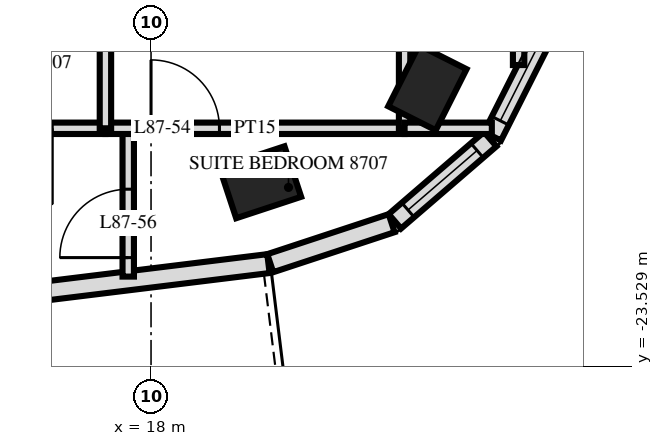
"""IFC4 building model, lengths in metres.
Left out: names, types, materials, properties, quantities, classifications, styles, units other than length and angle.
Written with IfcOpenShell. Run it as: python <this file> out.ifc"""

import sys

from ifc_helpers import new_model, si_unit, direction, frame, frame_2d, origin, origin_2d, place, context, subcontext, project, spatial, rectangle, extrude, element, fill, save


model = new_model("IFC4")
c1 = context("Model", 3, precision=1e-05, world=origin(), true_north=direction((0.0, 1.0)))
c2 = subcontext(c1, "Body", "Model", "MODEL_VIEW")
j1 = project(units=[si_unit("LENGTHUNIT", "METRE"), si_unit("PLANEANGLEUNIT", "RADIAN")], contexts=[c1])
p1 = place(None, origin())
s1 = spatial("IfcSite", under=j1, at=p1, CompositionType="ELEMENT")
p2 = place(p1, origin())
s2 = spatial("IfcBuilding", under=s1, at=p2, CompositionType="ELEMENT")
p3 = place(p2, frame((0.0, 0.0, 330.6)))
s3 = spatial("IfcBuildingStorey", under=s2, at=p3, CompositionType="ELEMENT", Elevation=330.6)
for number, where, z_axis, x_axis in (
    (1, (19.438, -21.11, 0.0), (0.0, 0.0, 1.0), (0.95, 0.313, 0.0)),
    (2, (21.636, -19.866, 0.0), (0.0, 0.0, 1.0), (0.45, 0.893, 0.0)),
):
    element("IfcColumn", number, at=place(p3, frame(where, z_axis=z_axis, x_axis=x_axis)), inside=s3, PredefinedType="COLUMN", context=c2, shape_type="SweptSolid", body=[
        extrude(rectangle(XDim=0.9, YDim=0.7, at=origin_2d()), origin(), (0.0, 0.0, 1.0), 4.0),
    ])
p4 = place(p3, frame((-16.138, -26.561, 0.0), z_axis=(0.0, 0.0, 1.0), x_axis=(0.992546726876, 0.121864658405, 0.0)))
e3 = element("IfcWall", 3, at=p4, inside=s3, PredefinedType="SOLIDWALL", context=c2, shape_type="SweptSolid", body=[
    extrude(rectangle(XDim=35.951, YDim=0.25, at=frame_2d((17.975, 0.0))), origin(), (0.0, 0.0, 1.0), 3.72),
])
p5 = place(p4, frame((0.575, 0.0, 0.0)))
e4 = element("IfcOpeningElement", 4, at=p5, cuts=e3, PredefinedType="OPENING", context=c2, shape_type="SweptSolid", body=[
    extrude(rectangle(XDim=1.8, YDim=2.4, at=frame_2d((0.9, 1.2))), frame((0.0, 0.135, 0.0), z_axis=(0.0, -1.0, 0.0), x_axis=(1.0, 0.0, 0.0)), (0.0, 0.0, 1.0), 0.27),
])
p6 = place(p4, frame((6.576, 0.0, 0.0)))
e5 = element("IfcOpeningElement", 5, at=p6, cuts=e3, PredefinedType="OPENING", context=c2, shape_type="SweptSolid", body=[
    extrude(rectangle(XDim=1.8, YDim=2.4, at=frame_2d((0.9, 1.2))), frame((0.0, 0.135, 0.0), z_axis=(0.0, -1.0, 0.0), x_axis=(1.0, 0.0, 0.0)), (0.0, 0.0, 1.0), 0.27),
])
p7 = place(p4, frame((12.575, 0.0, 0.0)))
e6 = element("IfcOpeningElement", 6, at=p7, cuts=e3, PredefinedType="OPENING", context=c2, shape_type="SweptSolid", body=[
    extrude(rectangle(XDim=1.8, YDim=2.4, at=frame_2d((0.9, 1.2))), frame((0.0, 0.135, 0.0), z_axis=(0.0, -1.0, 0.0), x_axis=(1.0, 0.0, 0.0)), (0.0, 0.0, 1.0), 0.27),
])
p8 = place(p4, frame((18.575, 0.0, 0.0)))
e7 = element("IfcOpeningElement", 7, at=p8, cuts=e3, PredefinedType="OPENING", context=c2, shape_type="SweptSolid", body=[
    extrude(rectangle(XDim=1.8, YDim=2.4, at=frame_2d((0.9, 1.2))), frame((0.0, 0.135, 0.0), z_axis=(0.0, -1.0, 0.0), x_axis=(1.0, 0.0, 0.0)), (0.0, 0.0, 1.0), 0.27),
])
p9 = place(p4, frame((22.528, 0.0, 0.0)))
e8 = element("IfcOpeningElement", 8, at=p9, cuts=e3, PredefinedType="OPENING", context=c2, shape_type="SweptSolid", body=[
    extrude(rectangle(XDim=1.2, YDim=2.4, at=frame_2d((0.6, 1.2))), frame((0.0, 0.135, 0.0), z_axis=(0.0, -1.0, 0.0), x_axis=(1.0, 0.0, 0.0)), (0.0, 0.0, 1.0), 0.27),
])
p10 = place(p4, frame((25.923, 0.0, 0.0)))
e9 = element("IfcOpeningElement", 9, at=p10, cuts=e3, PredefinedType="OPENING", context=c2, shape_type="SweptSolid", body=[
    extrude(rectangle(XDim=1.8, YDim=2.4, at=frame_2d((0.9, 1.2))), frame((0.0, 0.135, 0.0), z_axis=(0.0, -1.0, 0.0), x_axis=(1.0, 0.0, 0.0)), (0.0, 0.0, 1.0), 0.27),
])
p11 = place(p4, frame((30.576, 0.0, 0.0)))
e10 = element("IfcOpeningElement", 10, at=p11, cuts=e3, PredefinedType="OPENING", context=c2, shape_type="SweptSolid", body=[
    extrude(rectangle(XDim=1.8, YDim=2.4, at=frame_2d((0.9, 1.2))), frame((0.0, 0.135, 0.0), z_axis=(0.0, -1.0, 0.0), x_axis=(1.0, 0.0, 0.0)), (0.0, 0.0, 1.0), 0.27),
])
p12 = place(p3, frame((19.568, -22.175, 0.0), z_axis=(0.0, 0.0, 1.0), x_axis=(0.949694735798, 0.313177120489, 0.0)))
e11 = element("IfcWall", 11, at=p12, inside=s3, PredefinedType="SOLIDWALL", context=c2, shape_type="SweptSolid", body=[
    extrude(rectangle(XDim=1.681, YDim=0.25, at=frame_2d((0.841, 0.0))), origin(), (0.0, 0.0, 1.0), 3.72),
])
p13 = place(p3, frame((21.208, -21.624, 0.0), z_axis=(0.0, 0.0, 1.0), x_axis=(0.757568315466, 0.652755886531, 0.0)))
e12 = element("IfcWall", 12, at=p13, inside=s3, PredefinedType="SOLIDWALL", context=c2, shape_type="SweptSolid", body=[
    extrude(rectangle(XDim=1.656, YDim=0.25, at=frame_2d((0.828, 0.0))), origin(), (0.0, 0.0, 1.0), 3.72),
])
p14 = place(p13, frame((0.228, 0.0, 0.9)))
e13 = element("IfcOpeningElement", 13, at=p14, cuts=e12, PredefinedType="OPENING", context=c2, shape_type="SweptSolid", body=[
    extrude(rectangle(XDim=1.2, YDim=1.5, at=frame_2d((0.6, 0.75))), frame((0.0, 0.135, 0.0), z_axis=(0.0, -1.0, 0.0), x_axis=(1.0, 0.0, 0.0)), (0.0, 0.0, 1.0), 0.27),
])
p15 = place(p3, frame((22.493, -20.505, 0.0), z_axis=(0.0, 0.0, 1.0), x_axis=(0.449982385812, 0.893037430604, 0.0)))
e14 = element("IfcWall", 14, at=p15, inside=s3, PredefinedType="SOLIDWALL", context=c2, shape_type="SweptSolid", body=[
    extrude(rectangle(XDim=1.656, YDim=0.25, at=frame_2d((0.828, 0.0))), origin(), (0.0, 0.0, 1.0), 3.72),
])
p16 = place(p15, frame((0.228, 0.0, 0.9)))
e15 = element("IfcOpeningElement", 15, at=p16, cuts=e14, PredefinedType="OPENING", context=c2, shape_type="SweptSolid", body=[
    extrude(rectangle(XDim=1.2, YDim=1.5, at=frame_2d((0.6, 0.75))), frame((0.0, 0.135, 0.0), z_axis=(0.0, -1.0, 0.0), x_axis=(1.0, 0.0, 0.0)), (0.0, 0.0, 1.0), 0.27),
])
p17 = place(p3, frame((22.836, -19.568, 0.0), z_axis=(0.0, 0.0, 1.0), x_axis=(0.0, 1.0, 0.0)))
e16 = element("IfcWall", 16, at=p17, inside=s3, PredefinedType="PLUMBINGWALL", context=c2, shape_type="SweptSolid", body=[
    extrude(rectangle(XDim=2.768, YDim=0.15, at=frame_2d((1.384, 0.0))), origin(), (0.0, 0.0, 1.0), 3.72),
])
p18 = place(p3, frame((21.336, -20.4, 0.0), z_axis=(0.0, 0.0, 1.0), x_axis=(0.0, 1.0, 0.0)))
e17 = element("IfcWall", 17, at=p18, inside=s3, PredefinedType="PLUMBINGWALL", context=c2, shape_type="SweptSolid", body=[
    extrude(rectangle(XDim=3.6, YDim=0.15, at=frame_2d((1.8, 0.0))), origin(), (0.0, 0.0, 1.0), 3.72),
])
p19 = place(p18, frame((1.42, 0.0, 0.0)))
e18 = element("IfcOpeningElement", 18, at=p19, cuts=e17, PredefinedType="OPENING", context=c2, shape_type="SweptSolid", body=[
    extrude(rectangle(XDim=0.8, YDim=2.1, at=frame_2d((0.4, 1.05))), frame((0.0, 0.085, 0.0), z_axis=(0.0, -1.0, 0.0), x_axis=(1.0, 0.0, 0.0)), (0.0, 0.0, 1.0), 0.17),
])
p20 = place(p3, frame((17.7, -22.351, 0.0), z_axis=(0.0, 0.0, 1.0), x_axis=(0.0, 1.0, 0.0)))
e19 = element("IfcWall", 19, at=p20, inside=s3, PredefinedType="PARTITIONING", context=c2, shape_type="SweptSolid", body=[
    extrude(rectangle(XDim=1.951, YDim=0.15, at=frame_2d((0.976, 0.0))), origin(), (0.0, 0.0, 1.0), 3.72),
])
p21 = place(p20, frame((0.25, 0.0, 0.0)))
e20 = element("IfcOpeningElement", 20, at=p21, cuts=e19, PredefinedType="OPENING", context=c2, shape_type="SweptSolid", body=[
    extrude(rectangle(XDim=0.9, YDim=2.1, at=frame_2d((0.45, 1.05))), frame((0.0, 0.085, 0.0), z_axis=(0.0, -1.0, 0.0), x_axis=(1.0, 0.0, 0.0)), (0.0, 0.0, 1.0), 0.17),
])
p22 = place(p3, frame((17.4, -20.4, 0.0), z_axis=(0.0, 0.0, 1.0), x_axis=(0.0, 1.0, 0.0)))
e21 = element("IfcWall", 21, at=p22, inside=s3, PredefinedType="PARTITIONING", context=c2, shape_type="SweptSolid", body=[
    extrude(rectangle(XDim=3.6, YDim=0.15, at=frame_2d((1.8, 0.0))), origin(), (0.0, 0.0, 1.0), 3.72),
])
p23 = place(p3, frame((15.0, -20.4, 0.0), z_axis=(0.0, 0.0, 1.0), x_axis=(1.0, 0.0, 0.0)))
e22 = element("IfcWall", 22, at=p23, inside=s3, PredefinedType="PARTITIONING", context=c2, shape_type="SweptSolid", body=[
    extrude(rectangle(XDim=2.4, YDim=0.15, at=frame_2d((1.2, 0.0))), origin(), (0.0, 0.0, 1.0), 3.72),
])
p24 = place(p23, frame((0.7, 0.0, 0.0)))
e23 = element("IfcOpeningElement", 23, at=p24, cuts=e22, PredefinedType="OPENING", context=c2, shape_type="SweptSolid", body=[
    extrude(rectangle(XDim=1.0, YDim=2.1, at=frame_2d((0.5, 1.05))), frame((0.0, 0.085, 0.0), z_axis=(0.0, -1.0, 0.0), x_axis=(1.0, 0.0, 0.0)), (0.0, 0.0, 1.0), 0.17),
])
p25 = place(p3, frame((17.4, -20.4, 0.0), z_axis=(0.0, 0.0, 1.0), x_axis=(1.0, 0.0, 0.0)))
e24 = element("IfcWall", 24, at=p25, inside=s3, PredefinedType="PARTITIONING", context=c2, shape_type="SweptSolid", body=[
    extrude(rectangle(XDim=3.936, YDim=0.15, at=frame_2d((1.968, 0.0))), origin(), (0.0, 0.0, 1.0), 3.72),
])
p26 = place(p25, frame((0.6, 0.0, 0.0)))
e25 = element("IfcOpeningElement", 25, at=p26, cuts=e24, PredefinedType="OPENING", context=c2, shape_type="SweptSolid", body=[
    extrude(rectangle(XDim=0.9, YDim=2.1, at=frame_2d((0.45, 1.05))), frame((0.0, 0.085, 0.0), z_axis=(0.0, -1.0, 0.0), x_axis=(1.0, 0.0, 0.0)), (0.0, 0.0, 1.0), 0.17),
])
p27 = place(p3, frame((21.336, -20.4, 0.0), z_axis=(0.0, 0.0, 1.0), x_axis=(1.0, 0.0, 0.0)))
e26 = element("IfcWall", 26, at=p27, inside=s3, PredefinedType="PLUMBINGWALL", context=c2, shape_type="SweptSolid", body=[
    extrude(rectangle(XDim=1.148, YDim=0.15, at=frame_2d((0.574, 0.0))), origin(), (0.0, 0.0, 1.0), 3.72),
])
p28 = place(p14, origin())
e27 = element("IfcWindow", 27, at=p28, inside=s3, PartitioningType="SINGLE_PANEL", PredefinedType="WINDOW", context=c2, shape_type="SweptSolid", body=[
    extrude(rectangle(XDim=1.2, YDim=1.5, at=frame_2d((0.6, 0.75))), frame((0.0, 0.03, 0.0), z_axis=(0.0, -1.0, 0.0), x_axis=(1.0, 0.0, 0.0)), (0.0, 0.0, 1.0), 0.06),
])
fill(e13, e27)
p29 = place(p16, origin())
e28 = element("IfcWindow", 28, at=p29, inside=s3, PartitioningType="SINGLE_PANEL", PredefinedType="WINDOW", context=c2, shape_type="SweptSolid", body=[
    extrude(rectangle(XDim=1.2, YDim=1.5, at=frame_2d((0.6, 0.75))), frame((0.0, 0.03, 0.0), z_axis=(0.0, -1.0, 0.0), x_axis=(1.0, 0.0, 0.0)), (0.0, 0.0, 1.0), 0.06),
])
fill(e15, e28)
p30 = place(p26, origin())
e29 = element("IfcDoor", 29, at=p30, inside=s3, OperationType="SINGLE_SWING_RIGHT", PredefinedType="DOOR", context=c2, shape_type="SweptSolid", body=[
    extrude(rectangle(XDim=0.9, YDim=2.1, at=frame_2d((0.45, 1.05))), frame((0.0, 0.025, 0.0), z_axis=(0.0, -1.0, 0.0), x_axis=(1.0, 0.0, 0.0)), (0.0, 0.0, 1.0), 0.05),
])
fill(e25, e29)
p31 = place(p21, origin())
e30 = element("IfcDoor", 30, at=p31, inside=s3, OperationType="SINGLE_SWING_RIGHT", PredefinedType="DOOR", context=c2, shape_type="SweptSolid", body=[
    extrude(rectangle(XDim=0.9, YDim=2.1, at=frame_2d((0.45, 1.05))), frame((0.0, 0.025, 0.0), z_axis=(0.0, -1.0, 0.0), x_axis=(1.0, 0.0, 0.0)), (0.0, 0.0, 1.0), 0.05),
])
fill(e20, e30)
save(model, sys.argv[1])
